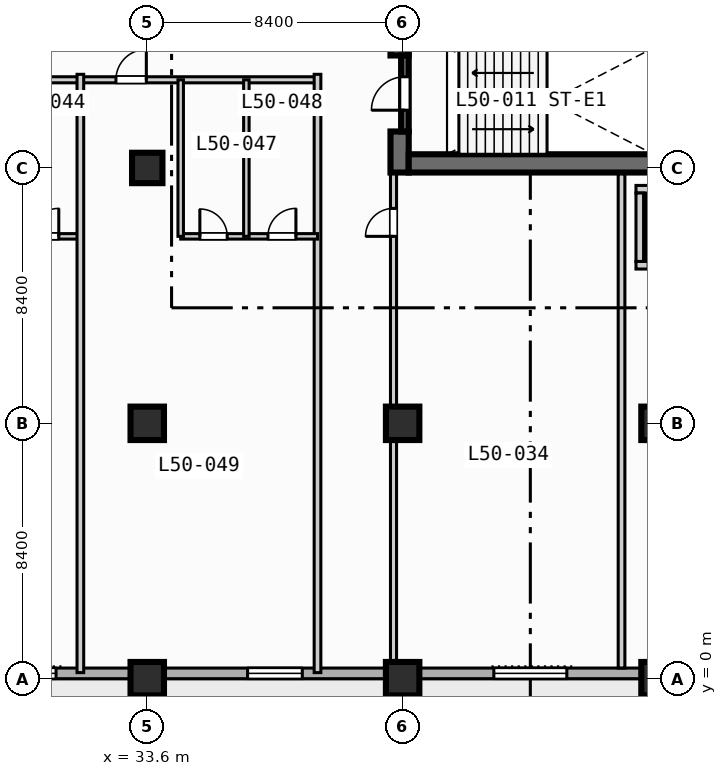
"""IFC4 building model, lengths in metres.
Left out: names, types, materials, properties, quantities, classifications, styles, units other than length and angle.
Written with IfcOpenShell. Run it as: python <this file> out.ifc"""

import sys

from ifc_helpers import new_model, si_unit, direction, frame, frame_2d, origin, origin_2d, place, context, subcontext, project, spatial, rectangle, extrude, element, fill, save


model = new_model("IFC4")
c1 = context("Model", 3, precision=1e-05, world=origin(), true_north=direction((0.0, 1.0)))
c2 = subcontext(c1, "Body", "Model", "MODEL_VIEW")
j1 = project(units=[si_unit("LENGTHUNIT", "METRE"), si_unit("PLANEANGLEUNIT", "RADIAN")], contexts=[c1])
p1 = place(None, origin())
s1 = spatial("IfcSite", under=j1, at=p1, CompositionType="ELEMENT")
p2 = place(p1, origin())
s2 = spatial("IfcBuilding", under=s1, at=p2, CompositionType="ELEMENT")
p3 = place(p2, frame((0.0, 0.0, 205.0)))
s3 = spatial("IfcBuildingStorey", under=s2, at=p3, CompositionType="ELEMENT", Elevation=205.0)
p4 = place(p3, frame((41.9, 16.65, 0.0), z_axis=(0.0, 0.0, 1.0), x_axis=(0.0, 1.0, 0.0)))
e1 = element("IfcWall", 1, at=p4, inside=s3, PredefinedType="SHEAR", context=c2, shape_type="SweptSolid", body=[
    extrude(rectangle(XDim=1.35, YDim=0.6, at=frame_2d((0.675, 0.0))), origin(), (0.0, 0.0, 1.0), 3.47),
])
p5 = place(p3, frame((41.9, 20.5, 0.0), z_axis=(0.0, 0.0, 1.0), x_axis=(0.0, 1.0, 0.0)))
e2 = element("IfcWall", 2, at=p5, inside=s3, PredefinedType="SHEAR", context=c2, shape_type="SweptSolid", body=[
    extrude(rectangle(XDim=5.0, YDim=0.6, at=frame_2d((2.5, 0.0))), origin(), (0.0, 0.0, 1.0), 3.47),
])
p6 = place(p3, frame((42.2, 16.95, 0.0), z_axis=(0.0, 0.0, 1.0), x_axis=(1.0, 0.0, 0.0)))
e3 = element("IfcWall", 3, at=p6, inside=s3, PredefinedType="SHEAR", context=c2, shape_type="SweptSolid", body=[
    extrude(rectangle(XDim=16.35, YDim=0.6, at=frame_2d((8.175, 0.0))), origin(), (0.0, 0.0, 1.0), 3.47),
])
for number, where, z_axis, x_axis in (
    (4, (33.6, 0.0, 0.0), (0.0, 0.0, 1.0), (1.0, 0.0, 0.0)),
    (5, (33.6, 8.4, 0.0), (0.0, 0.0, 1.0), (1.0, 0.0, 0.0)),
):
    element("IfcColumn", number, at=place(p3, frame(where, z_axis=z_axis, x_axis=x_axis)), inside=s3, PredefinedType="COLUMN", context=c2, shape_type="SweptSolid", body=[
        extrude(rectangle(XDim=1.1, YDim=1.1, at=origin_2d()), origin(), (0.0, 0.0, 1.0), 3.7),
    ])
p7 = place(p3, frame((33.6, 16.8, 0.0), z_axis=(0.0, 0.0, 1.0), x_axis=(1.0, 0.0, 0.0)))
e6 = element("IfcColumn", 6, at=p7, inside=s3, PredefinedType="COLUMN", context=c2, shape_type="SweptSolid", body=[
    extrude(rectangle(XDim=1.0, YDim=1.0, at=origin_2d()), origin(), (0.0, 0.0, 1.0), 3.7),
])
for number, where, z_axis, x_axis in (
    (7, (42.0, 0.0, 0.0), (0.0, 0.0, 1.0), (1.0, 0.0, 0.0)),
    (8, (42.0, 8.4, 0.0), (0.0, 0.0, 1.0), (1.0, 0.0, 0.0)),
    (9, (50.4, 0.0, 0.0), (0.0, 0.0, 1.0), (1.0, 0.0, 0.0)),
    (10, (50.4, 8.4, 0.0), (0.0, 0.0, 1.0), (1.0, 0.0, 0.0)),
):
    element("IfcColumn", number, at=place(p3, frame(where, z_axis=z_axis, x_axis=x_axis)), inside=s3, PredefinedType="COLUMN", context=c2, shape_type="SweptSolid", body=[
        extrude(rectangle(XDim=1.1, YDim=1.1, at=origin_2d()), origin(), (0.0, 0.0, 1.0), 3.7),
    ])
p8 = place(p3, frame((72.425, 0.175, 0.0), z_axis=(0.0, 0.0, 1.0), x_axis=(-1.0, 0.0, 0.0)))
e11 = element("IfcWall", 11, at=p8, inside=s3, PredefinedType="STANDARD", context=c2, shape_type="SweptSolid", body=[
    extrude(rectangle(XDim=69.25, YDim=0.35, at=frame_2d((34.625, 0.0))), origin(), (0.0, 0.0, 1.0), 3.47),
])
p9 = place(p8, frame((52.825, 0.0, 0.0)))
e12 = element("IfcOpeningElement", 12, at=p9, cuts=e11, PredefinedType="OPENING", context=c2, shape_type="SweptSolid", body=[
    extrude(rectangle(XDim=1.4, YDim=2.2, at=frame_2d((0.7, 1.1))), frame((0.0, 0.185, 0.0), z_axis=(0.0, -1.0, 0.0), x_axis=(1.0, 0.0, 0.0)), (0.0, 0.0, 1.0), 0.37),
])
p10 = place(p8, frame((41.825, 0.0, 0.85)))
e13 = element("IfcOpeningElement", 13, at=p10, cuts=e11, PredefinedType="OPENING", context=c2, shape_type="SweptSolid", body=[
    extrude(rectangle(XDim=2.4, YDim=1.95, at=frame_2d((1.2, 0.975))), frame((0.0, 0.185, 0.0), z_axis=(0.0, -1.0, 0.0), x_axis=(1.0, 0.0, 0.0)), (0.0, 0.0, 1.0), 0.37),
])
p11 = place(p8, frame((33.725, 0.0, 0.85)))
e14 = element("IfcOpeningElement", 14, at=p11, cuts=e11, PredefinedType="OPENING", context=c2, shape_type="SweptSolid", body=[
    extrude(rectangle(XDim=1.8, YDim=1.8, at=frame_2d((0.9, 0.9))), frame((0.0, 0.185, 0.0), z_axis=(0.0, -1.0, 0.0), x_axis=(1.0, 0.0, 0.0)), (0.0, 0.0, 1.0), 0.37),
])
p12 = place(p8, frame((25.025, 0.0, 0.85)))
e15 = element("IfcOpeningElement", 15, at=p12, cuts=e11, PredefinedType="OPENING", context=c2, shape_type="SweptSolid", body=[
    extrude(rectangle(XDim=2.4, YDim=1.95, at=frame_2d((1.2, 0.975))), frame((0.0, 0.185, 0.0), z_axis=(0.0, -1.0, 0.0), x_axis=(1.0, 0.0, 0.0)), (0.0, 0.0, 1.0), 0.37),
])
p13 = place(p8, frame((64.675, 0.0, 0.85)))
e16 = element("IfcOpeningElement", 16, at=p13, cuts=e11, PredefinedType="OPENING", context=c2, shape_type="SweptSolid", body=[
    extrude(rectangle(XDim=1.8, YDim=1.8, at=frame_2d((0.9, 0.9))), frame((0.0, 0.185, 0.0), z_axis=(0.0, -1.0, 0.0), x_axis=(1.0, 0.0, 0.0)), (0.0, 0.0, 1.0), 0.37),
])
p14 = place(p8, frame((50.275, 0.0, 0.85)))
e17 = element("IfcOpeningElement", 17, at=p14, cuts=e11, PredefinedType="OPENING", context=c2, shape_type="SweptSolid", body=[
    extrude(rectangle(XDim=1.8, YDim=1.8, at=frame_2d((0.9, 0.9))), frame((0.0, 0.185, 0.0), z_axis=(0.0, -1.0, 0.0), x_axis=(1.0, 0.0, 0.0)), (0.0, 0.0, 1.0), 0.37),
])
p15 = place(p3, frame((42.075, 18.0, 0.0), z_axis=(0.0, 0.0, 1.0), x_axis=(0.0, 1.0, 0.0)))
e18 = element("IfcWall", 18, at=p15, inside=s3, PredefinedType="SOLIDWALL", context=c2, shape_type="SweptSolid", body=[
    extrude(rectangle(XDim=2.5, YDim=0.25, at=frame_2d((1.25, 0.0))), origin(), (0.0, 0.0, 1.0), 3.47),
])
p16 = place(p15, frame((0.7, 0.0, 0.0)))
e19 = element("IfcOpeningElement", 19, at=p16, cuts=e18, PredefinedType="OPENING", context=c2, shape_type="SweptSolid", body=[
    extrude(rectangle(XDim=1.1, YDim=2.15, at=frame_2d((0.55, 1.075))), frame((0.0, 0.135, 0.0), z_axis=(0.0, -1.0, 0.0), x_axis=(1.0, 0.0, 0.0)), (0.0, 0.0, 1.0), 0.27),
])
p17 = place(p3, frame((49.675, 13.6, 0.0), z_axis=(0.0, 0.0, 1.0), x_axis=(1.0, 0.0, 0.0)))
e20 = element("IfcWall", 20, at=p17, inside=s3, PredefinedType="SOLIDWALL", context=c2, shape_type="SweptSolid", body=[
    extrude(rectangle(XDim=2.25, YDim=0.25, at=frame_2d((1.125, 0.0))), origin(), (0.0, 0.0, 1.0), 3.47),
])
p18 = place(p17, frame((0.4, 0.0, 0.0)))
e21 = element("IfcOpeningElement", 21, at=p18, cuts=e20, PredefinedType="OPENING", context=c2, shape_type="SweptSolid", body=[
    extrude(rectangle(XDim=1.1, YDim=2.15, at=frame_2d((0.55, 1.075))), frame((0.0, 0.135, 0.0), z_axis=(0.0, -1.0, 0.0), x_axis=(1.0, 0.0, 0.0)), (0.0, 0.0, 1.0), 0.27),
])
for number, where, z_axis, x_axis in (
    (22, (49.675, 16.1, 0.0), (0.0, 0.0, 1.0), (1.0, 0.0, 0.0)),
    (23, (49.8, 13.725, 0.0), (0.0, 0.0, 1.0), (0.0, 1.0, 0.0)),
):
    element("IfcWall", number, at=place(p3, frame(where, z_axis=z_axis, x_axis=x_axis)), inside=s3, PredefinedType="SOLIDWALL", context=c2, shape_type="SweptSolid", body=[
        extrude(rectangle(XDim=2.25, YDim=0.25, at=frame_2d((1.125, 0.0))), origin(), (0.0, 0.0, 1.0), 3.47),
    ])
p19 = place(p3, frame((41.7, 0.35, 0.0), z_axis=(0.0, 0.0, 1.0), x_axis=(0.0, 1.0, 0.0)))
e24 = element("IfcWall", 24, at=p19, inside=s3, PredefinedType="PARTITIONING", context=c2, shape_type="SweptSolid", body=[
    extrude(rectangle(XDim=16.25, YDim=0.2, at=frame_2d((8.125, 0.0))), origin(), (0.0, 0.0, 1.0), 2.82),
])
p20 = place(p19, frame((14.2, 0.0, 0.0)))
e25 = element("IfcOpeningElement", 25, at=p20, cuts=e24, PredefinedType="OPENING", context=c2, shape_type="SweptSolid", body=[
    extrude(rectangle(XDim=0.92, YDim=2.1, at=frame_2d((0.46, 1.05))), frame((0.0, 0.11, 0.0), z_axis=(0.0, -1.0, 0.0), x_axis=(1.0, 0.0, 0.0)), (0.0, 0.0, 1.0), 0.22),
])
p21 = place(p3, frame((49.2, 0.35, 0.0), z_axis=(0.0, 0.0, 1.0), x_axis=(0.0, 1.0, 0.0)))
e26 = element("IfcWall", 26, at=p21, inside=s3, PredefinedType="PARTITIONING", context=c2, shape_type="SweptSolid", body=[
    extrude(rectangle(XDim=16.25, YDim=0.22, at=frame_2d((8.125, 0.0))), origin(), (0.0, 0.0, 1.0), 3.47),
])
p22 = place(p3, frame((3.4, 19.7, 0.0), z_axis=(0.0, 0.0, 1.0), x_axis=(1.0, 0.0, 0.0)))
e27 = element("IfcWall", 27, at=p22, inside=s3, PredefinedType="PARTITIONING", context=c2, shape_type="SweptSolid", body=[
    extrude(rectangle(XDim=35.8, YDim=0.2, at=frame_2d((17.9, 0.0))), origin(), (0.0, 0.0, 1.0), 3.47),
])
p23 = place(p22, frame((1.47, 0.0, 0.0)))
e28 = element("IfcOpeningElement", 28, at=p23, cuts=e27, PredefinedType="OPENING", context=c2, shape_type="SweptSolid", body=[
    extrude(rectangle(XDim=1.0, YDim=2.15, at=frame_2d((0.5, 1.075))), frame((0.0, 0.11, 0.0), z_axis=(0.0, -1.0, 0.0), x_axis=(1.0, 0.0, 0.0)), (0.0, 0.0, 1.0), 0.22),
])
p24 = place(p22, frame((9.87, 0.0, 0.0)))
e29 = element("IfcOpeningElement", 29, at=p24, cuts=e27, PredefinedType="OPENING", context=c2, shape_type="SweptSolid", body=[
    extrude(rectangle(XDim=1.0, YDim=2.15, at=frame_2d((0.5, 1.075))), frame((0.0, 0.11, 0.0), z_axis=(0.0, -1.0, 0.0), x_axis=(1.0, 0.0, 0.0)), (0.0, 0.0, 1.0), 0.22),
])
p25 = place(p22, frame((20.72, 0.0, 0.0)))
e30 = element("IfcOpeningElement", 30, at=p25, cuts=e27, PredefinedType="OPENING", context=c2, shape_type="SweptSolid", body=[
    extrude(rectangle(XDim=1.0, YDim=2.15, at=frame_2d((0.5, 1.075))), frame((0.0, 0.11, 0.0), z_axis=(0.0, -1.0, 0.0), x_axis=(1.0, 0.0, 0.0)), (0.0, 0.0, 1.0), 0.22),
])
p26 = place(p22, frame((29.17, 0.0, 0.0)))
e31 = element("IfcOpeningElement", 31, at=p26, cuts=e27, PredefinedType="OPENING", context=c2, shape_type="SweptSolid", body=[
    extrude(rectangle(XDim=1.0, YDim=2.15, at=frame_2d((0.5, 1.075))), frame((0.0, 0.11, 0.0), z_axis=(0.0, -1.0, 0.0), x_axis=(1.0, 0.0, 0.0)), (0.0, 0.0, 1.0), 0.22),
])
p27 = place(p3, frame((26.9, 14.55, 0.0), z_axis=(0.0, 0.0, 1.0), x_axis=(1.0, 0.0, 0.0)))
e32 = element("IfcWall", 32, at=p27, inside=s3, PredefinedType="PLUMBINGWALL", context=c2, shape_type="SweptSolid", body=[
    extrude(rectangle(XDim=4.5, YDim=0.18, at=frame_2d((2.25, 0.0))), origin(), (0.0, 0.0, 1.0), 3.47),
])
p28 = place(p27, frame((0.63, 0.0, 0.0)))
e33 = element("IfcOpeningElement", 33, at=p28, cuts=e32, PredefinedType="OPENING", context=c2, shape_type="SweptSolid", body=[
    extrude(rectangle(XDim=0.9, YDim=2.1, at=frame_2d((0.45, 1.05))), frame((0.0, 0.1, 0.0), z_axis=(0.0, -1.0, 0.0), x_axis=(1.0, 0.0, 0.0)), (0.0, 0.0, 1.0), 0.2),
])
p29 = place(p27, frame((2.87, 0.0, 0.0)))
e34 = element("IfcOpeningElement", 34, at=p29, cuts=e32, PredefinedType="OPENING", context=c2, shape_type="SweptSolid", body=[
    extrude(rectangle(XDim=0.92, YDim=2.1, at=frame_2d((0.46, 1.05))), frame((0.0, 0.1, 0.0), z_axis=(0.0, -1.0, 0.0), x_axis=(1.0, 0.0, 0.0)), (0.0, 0.0, 1.0), 0.2),
])
for number, where, z_axis, x_axis in (
    (35, (31.4, 0.2, 0.0), (0.0, 0.0, 1.0), (0.0, 1.0, 0.0)),
    (36, (39.2, 0.2, 0.0), (0.0, 0.0, 1.0), (0.0, 1.0, 0.0)),
):
    element("IfcWall", number, at=place(p3, frame(where, z_axis=z_axis, x_axis=x_axis)), inside=s3, PredefinedType="PARTITIONING", context=c2, shape_type="SweptSolid", body=[
        extrude(rectangle(XDim=19.68, YDim=0.22, at=frame_2d((9.84, 0.0))), origin(), (0.0, 0.0, 1.0), 3.47),
    ])
p30 = place(p3, frame((34.7, 14.55, 0.0), z_axis=(0.0, 0.0, 1.0), x_axis=(1.0, 0.0, 0.0)))
e37 = element("IfcWall", 37, at=p30, inside=s3, PredefinedType="PLUMBINGWALL", context=c2, shape_type="SweptSolid", body=[
    extrude(rectangle(XDim=4.5, YDim=0.18, at=frame_2d((2.25, 0.0))), origin(), (0.0, 0.0, 1.0), 3.47),
])
p31 = place(p30, frame((0.63, 0.0, 0.0)))
e38 = element("IfcOpeningElement", 38, at=p31, cuts=e37, PredefinedType="OPENING", context=c2, shape_type="SweptSolid", body=[
    extrude(rectangle(XDim=0.9, YDim=2.1, at=frame_2d((0.45, 1.05))), frame((0.0, 0.1, 0.0), z_axis=(0.0, -1.0, 0.0), x_axis=(1.0, 0.0, 0.0)), (0.0, 0.0, 1.0), 0.2),
])
p32 = place(p30, frame((2.87, 0.0, 0.0)))
e39 = element("IfcOpeningElement", 39, at=p32, cuts=e37, PredefinedType="OPENING", context=c2, shape_type="SweptSolid", body=[
    extrude(rectangle(XDim=0.92, YDim=2.1, at=frame_2d((0.46, 1.05))), frame((0.0, 0.1, 0.0), z_axis=(0.0, -1.0, 0.0), x_axis=(1.0, 0.0, 0.0)), (0.0, 0.0, 1.0), 0.2),
])
for number, where, z_axis, x_axis in (
    (40, (34.7, 14.55, 0.0), (0.0, 0.0, 1.0), (0.0, 1.0, 0.0)),
    (41, (36.86, 14.55, 0.0), (0.0, 0.0, 1.0), (0.0, 1.0, 0.0)),
):
    element("IfcWall", number, at=place(p3, frame(where, z_axis=z_axis, x_axis=x_axis)), inside=s3, PredefinedType="PLUMBINGWALL", context=c2, shape_type="SweptSolid", body=[
        extrude(rectangle(XDim=5.15, YDim=0.18, at=frame_2d((2.575, 0.0))), origin(), (0.0, 0.0, 1.0), 3.47),
    ])
p33 = place(p10, origin())
e42 = element("IfcWindow", 42, at=p33, inside=s3, PartitioningType="SINGLE_PANEL", PredefinedType="WINDOW", context=c2, shape_type="SweptSolid", body=[
    extrude(rectangle(XDim=2.4, YDim=1.95, at=frame_2d((1.2, 0.975))), frame((0.0, 0.03, 0.0), z_axis=(0.0, -1.0, 0.0), x_axis=(1.0, 0.0, 0.0)), (0.0, 0.0, 1.0), 0.06),
])
fill(e13, e42)
p34 = place(p11, origin())
e43 = element("IfcWindow", 43, at=p34, inside=s3, PartitioningType="SINGLE_PANEL", PredefinedType="WINDOW", context=c2, shape_type="SweptSolid", body=[
    extrude(rectangle(XDim=1.8, YDim=1.8, at=frame_2d((0.9, 0.9))), frame((0.0, 0.03, 0.0), z_axis=(0.0, -1.0, 0.0), x_axis=(1.0, 0.0, 0.0)), (0.0, 0.0, 1.0), 0.06),
])
fill(e14, e43)
p35 = place(p12, origin())
e44 = element("IfcWindow", 44, at=p35, inside=s3, PartitioningType="SINGLE_PANEL", PredefinedType="WINDOW", context=c2, shape_type="SweptSolid", body=[
    extrude(rectangle(XDim=2.4, YDim=1.95, at=frame_2d((1.2, 0.975))), frame((0.0, 0.03, 0.0), z_axis=(0.0, -1.0, 0.0), x_axis=(1.0, 0.0, 0.0)), (0.0, 0.0, 1.0), 0.06),
])
fill(e15, e44)
p36 = place(p16, origin())
e45 = element("IfcDoor", 45, at=p36, inside=s3, OperationType="SINGLE_SWING_LEFT", PredefinedType="DOOR", context=c2, shape_type="SweptSolid", body=[
    extrude(rectangle(XDim=1.1, YDim=2.15, at=frame_2d((0.55, 1.075))), frame((0.0, 0.025, 0.0), z_axis=(0.0, -1.0, 0.0), x_axis=(1.0, 0.0, 0.0)), (0.0, 0.0, 1.0), 0.05),
])
fill(e19, e45)
p37 = place(p20, origin())
e46 = element("IfcDoor", 46, at=p37, inside=s3, OperationType="SINGLE_SWING_LEFT", PredefinedType="DOOR", context=c2, shape_type="SweptSolid", body=[
    extrude(rectangle(XDim=0.92, YDim=2.1, at=frame_2d((0.46, 1.05))), frame((0.0, 0.025, 0.0), z_axis=(0.0, -1.0, 0.0), x_axis=(1.0, 0.0, 0.0)), (0.0, 0.0, 1.0), 0.05),
])
fill(e25, e46)
p38 = place(p26, origin())
e47 = element("IfcDoor", 47, at=p38, inside=s3, OperationType="SINGLE_SWING_RIGHT", PredefinedType="DOOR", context=c2, shape_type="SweptSolid", body=[
    extrude(rectangle(XDim=1.0, YDim=2.15, at=frame_2d((0.5, 1.075))), frame((0.0, 0.025, 0.0), z_axis=(0.0, -1.0, 0.0), x_axis=(1.0, 0.0, 0.0)), (0.0, 0.0, 1.0), 0.05),
])
fill(e31, e47)
p39 = place(p29, origin())
e48 = element("IfcDoor", 48, at=p39, inside=s3, OperationType="SINGLE_SWING_RIGHT", PredefinedType="DOOR", context=c2, shape_type="SweptSolid", body=[
    extrude(rectangle(XDim=0.92, YDim=2.1, at=frame_2d((0.46, 1.05))), frame((0.0, 0.025, 0.0), z_axis=(0.0, -1.0, 0.0), x_axis=(1.0, 0.0, 0.0)), (0.0, 0.0, 1.0), 0.05),
])
fill(e34, e48)
p40 = place(p31, origin())
e49 = element("IfcDoor", 49, at=p40, inside=s3, OperationType="SINGLE_SWING_LEFT", PredefinedType="DOOR", context=c2, shape_type="SweptSolid", body=[
    extrude(rectangle(XDim=0.9, YDim=2.1, at=frame_2d((0.45, 1.05))), frame((0.0, 0.025, 0.0), z_axis=(0.0, -1.0, 0.0), x_axis=(1.0, 0.0, 0.0)), (0.0, 0.0, 1.0), 0.05),
])
fill(e38, e49)
p41 = place(p32, origin())
e50 = element("IfcDoor", 50, at=p41, inside=s3, OperationType="SINGLE_SWING_RIGHT", PredefinedType="DOOR", context=c2, shape_type="SweptSolid", body=[
    extrude(rectangle(XDim=0.92, YDim=2.1, at=frame_2d((0.46, 1.05))), frame((0.0, 0.025, 0.0), z_axis=(0.0, -1.0, 0.0), x_axis=(1.0, 0.0, 0.0)), (0.0, 0.0, 1.0), 0.05),
])
fill(e39, e50)
save(model, sys.argv[1])
